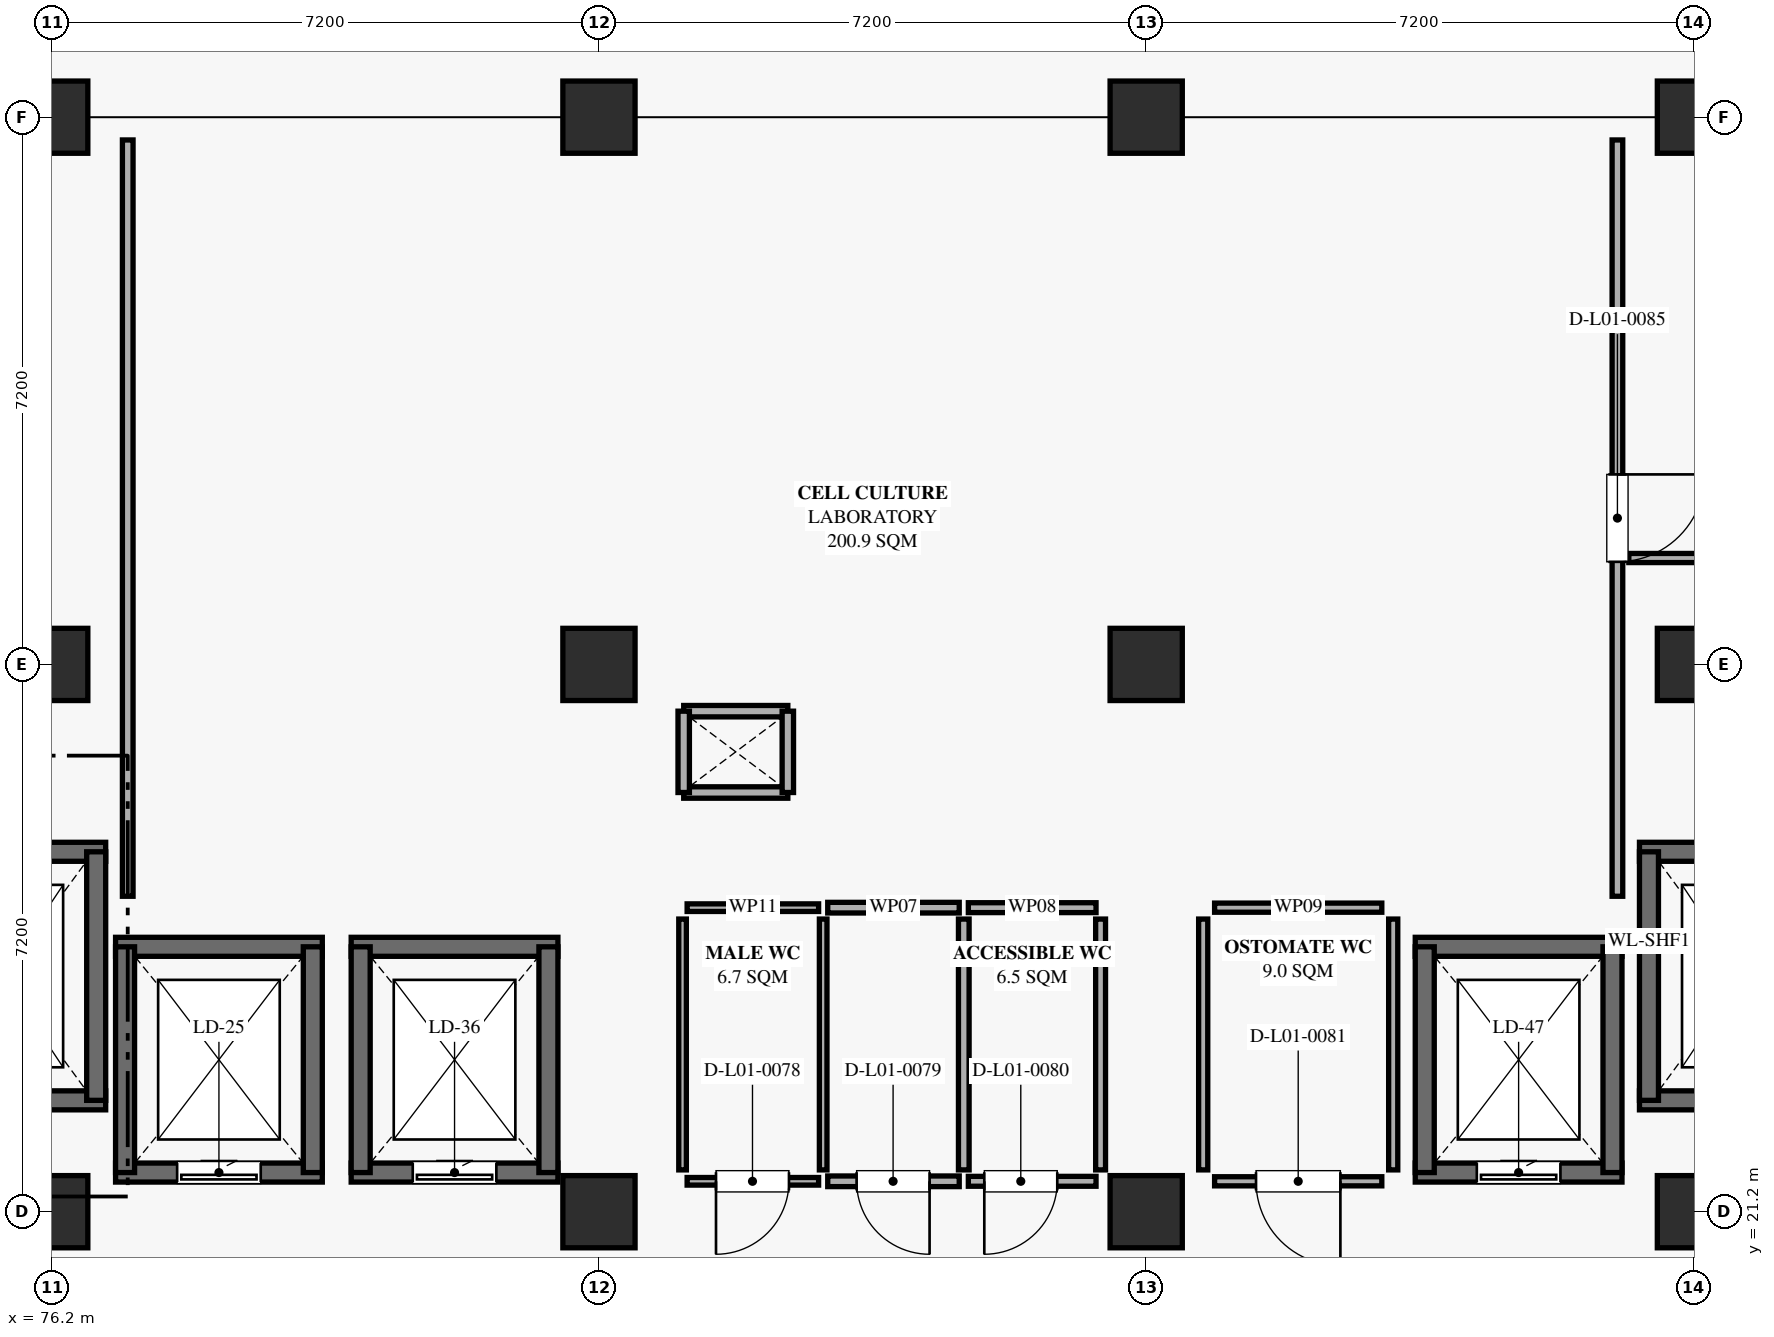
"""IFC4 building model, lengths in metres.
Left out: names, types, materials, properties, quantities, classifications, styles, units other than length and angle.
Written with IfcOpenShell. Run it as: python <this file> out.ifc"""

import sys

from ifc_helpers import new_model, si_unit, direction, frame, frame_2d, origin, origin_2d, place, context, subcontext, project, spatial, rectangle, extrude, element, fill, save


model = new_model("IFC4")
c1 = context("Model", 3, precision=1e-05, world=origin(), true_north=direction((0.0, 1.0)))
c2 = subcontext(c1, "Body", "Model", "MODEL_VIEW")
j1 = project(units=[si_unit("LENGTHUNIT", "METRE"), si_unit("PLANEANGLEUNIT", "RADIAN")], contexts=[c1])
p1 = place(None, origin())
s1 = spatial("IfcSite", under=j1, at=p1, CompositionType="ELEMENT")
p2 = place(p1, origin())
s2 = spatial("IfcBuilding", under=s1, at=p2, CompositionType="ELEMENT")
p3 = place(p2, frame((0.0, 0.0, 5.4)))
s3 = spatial("IfcBuildingStorey", under=s2, at=p3, CompositionType="ELEMENT", Elevation=5.4)
for number, where, z_axis, x_axis in (
    (1, (76.2, 21.2, 0.0), (0.0, 0.0, 1.0), (1.0, 0.0, 0.0)),
    (2, (83.4, 21.2, 0.0), (0.0, 0.0, 1.0), (1.0, 0.0, 0.0)),
    (3, (90.6, 21.2, 0.0), (0.0, 0.0, 1.0), (1.0, 0.0, 0.0)),
    (4, (97.8, 21.2, 0.0), (0.0, 0.0, 1.0), (1.0, 0.0, 0.0)),
    (5, (76.2, 28.4, 0.0), (0.0, 0.0, 1.0), (1.0, 0.0, 0.0)),
    (6, (83.4, 28.4, 0.0), (0.0, 0.0, 1.0), (1.0, 0.0, 0.0)),
    (7, (90.6, 28.4, 0.0), (0.0, 0.0, 1.0), (1.0, 0.0, 0.0)),
    (8, (97.8, 28.4, 0.0), (0.0, 0.0, 1.0), (1.0, 0.0, 0.0)),
    (9, (76.2, 35.6, 0.0), (0.0, 0.0, 1.0), (1.0, 0.0, 0.0)),
    (10, (83.4, 35.6, 0.0), (0.0, 0.0, 1.0), (1.0, 0.0, 0.0)),
    (11, (90.6, 35.6, 0.0), (0.0, 0.0, 1.0), (1.0, 0.0, 0.0)),
    (12, (97.8, 35.6, 0.0), (0.0, 0.0, 1.0), (1.0, 0.0, 0.0)),
):
    element("IfcColumn", number, at=place(p3, frame(where, z_axis=z_axis, x_axis=x_axis)), inside=s3, PredefinedType="COLUMN", context=c2, shape_type="SweptSolid", body=[
        extrude(rectangle(XDim=0.95, YDim=0.95, at=origin_2d()), origin(), (0.0, 0.0, 1.0), 5.04),
    ])
for number, where, z_axis, x_axis in (
    (13, (85.885, 26.715, 0.0), (0.0, 0.0, 1.0), (-1.0, 0.0, 0.0)),
    (14, (84.515, 27.785, 0.0), (0.0, 0.0, 1.0), (1.0, 0.0, 0.0)),
):
    element("IfcWall", number, at=place(p3, frame(where, z_axis=z_axis, x_axis=x_axis)), inside=s3, PredefinedType="PARTITIONING", context=c2, shape_type="SweptSolid", body=[
        extrude(rectangle(XDim=1.37, YDim=0.15, at=frame_2d((0.685, 0.0))), origin(), (0.0, 0.0, 1.0), 3.52),
    ])
for number, where, z_axis, x_axis in (
    (15, (84.515, 26.715, 0.0), (0.0, 0.0, 1.0), (0.0, 1.0, 0.0)),
    (16, (85.885, 27.785, 0.0), (0.0, 0.0, 1.0), (0.0, -1.0, 0.0)),
):
    element("IfcWall", number, at=place(p3, frame(where, z_axis=z_axis, x_axis=x_axis)), inside=s3, PredefinedType="PARTITIONING", context=c2, shape_type="SweptSolid", body=[
        extrude(rectangle(XDim=1.07, YDim=0.15, at=frame_2d((0.535, 0.0))), origin(), (0.0, 0.0, 1.0), 3.52),
    ])
for number, where, z_axis, x_axis in (
    (17, (76.91, 22.665, 0.0), (0.0, 0.0, 1.0), (-1.0, 0.0, 0.0)),
    (18, (74.19, 25.935, 0.0), (0.0, 0.0, 1.0), (1.0, 0.0, 0.0)),
):
    element("IfcWall", number, at=place(p3, frame(where, z_axis=z_axis, x_axis=x_axis)), inside=s3, PredefinedType="SHEAR", context=c2, shape_type="SweptSolid", body=[
        extrude(rectangle(XDim=2.72, YDim=0.25, at=frame_2d((1.36, 0.0))), origin(), (0.0, 0.0, 1.0), 4.77),
    ])
p4 = place(p3, frame((76.785, 25.935, 0.0), z_axis=(0.0, 0.0, 1.0), x_axis=(0.0, -1.0, 0.0)))
e19 = element("IfcWall", 19, at=p4, inside=s3, PredefinedType="SHEAR", context=c2, shape_type="SweptSolid", body=[
    extrude(rectangle(XDim=3.27, YDim=0.25, at=frame_2d((1.635, 0.0))), origin(), (0.0, 0.0, 1.0), 4.77),
])
for number, where, z_axis, x_axis in (
    (20, (99.81, 22.665, 0.0), (0.0, 0.0, 1.0), (-1.0, 0.0, 0.0)),
    (21, (97.09, 25.935, 0.0), (0.0, 0.0, 1.0), (1.0, 0.0, 0.0)),
):
    element("IfcWall", number, at=place(p3, frame(where, z_axis=z_axis, x_axis=x_axis)), inside=s3, PredefinedType="SHEAR", context=c2, shape_type="SweptSolid", body=[
        extrude(rectangle(XDim=2.72, YDim=0.25, at=frame_2d((1.36, 0.0))), origin(), (0.0, 0.0, 1.0), 4.77),
    ])
p5 = place(p3, frame((97.215, 22.665, 0.0), z_axis=(0.0, 0.0, 1.0), x_axis=(0.0, 1.0, 0.0)))
e22 = element("IfcWall", 22, at=p5, inside=s3, PredefinedType="SHEAR", context=c2, shape_type="SweptSolid", body=[
    extrude(rectangle(XDim=3.27, YDim=0.25, at=frame_2d((1.635, 0.0))), origin(), (0.0, 0.0, 1.0), 4.77),
])
p6 = place(p3, frame((79.76, 21.715, 0.0), z_axis=(0.0, 0.0, 1.0), x_axis=(-1.0, 0.0, 0.0)))
e23 = element("IfcWall", 23, at=p6, inside=s3, PredefinedType="SHEAR", context=c2, shape_type="SweptSolid", body=[
    extrude(rectangle(XDim=2.72, YDim=0.25, at=frame_2d((1.36, 0.0))), origin(), (0.0, 0.0, 1.0), 4.77),
])
p7 = place(p6, frame((0.81, 0.0, 0.0)))
e24 = element("IfcOpeningElement", 24, at=p7, cuts=e23, PredefinedType="OPENING", context=c2, shape_type="SweptSolid", body=[
    extrude(rectangle(XDim=1.1, YDim=2.2, at=frame_2d((0.55, 1.1))), frame((0.0, 0.135, 0.0), z_axis=(0.0, -1.0, 0.0), x_axis=(1.0, 0.0, 0.0)), (0.0, 0.0, 1.0), 0.27),
])
p8 = place(p3, frame((77.04, 24.685, 0.0), z_axis=(0.0, 0.0, 1.0), x_axis=(1.0, 0.0, 0.0)))
e25 = element("IfcWall", 25, at=p8, inside=s3, PredefinedType="SHEAR", context=c2, shape_type="SweptSolid", body=[
    extrude(rectangle(XDim=2.72, YDim=0.25, at=frame_2d((1.36, 0.0))), origin(), (0.0, 0.0, 1.0), 4.77),
])
for number, where, z_axis, x_axis in (
    (26, (77.165, 21.715, 0.0), (0.0, 0.0, 1.0), (0.0, 1.0, 0.0)),
    (27, (79.635, 24.685, 0.0), (0.0, 0.0, 1.0), (0.0, -1.0, 0.0)),
):
    element("IfcWall", number, at=place(p3, frame(where, z_axis=z_axis, x_axis=x_axis)), inside=s3, PredefinedType="SHEAR", context=c2, shape_type="SweptSolid", body=[
        extrude(rectangle(XDim=2.97, YDim=0.25, at=frame_2d((1.485, 0.0))), origin(), (0.0, 0.0, 1.0), 4.77),
    ])
p9 = place(p3, frame((82.86, 21.715, 0.0), z_axis=(0.0, 0.0, 1.0), x_axis=(-1.0, 0.0, 0.0)))
e28 = element("IfcWall", 28, at=p9, inside=s3, PredefinedType="SHEAR", context=c2, shape_type="SweptSolid", body=[
    extrude(rectangle(XDim=2.72, YDim=0.25, at=frame_2d((1.36, 0.0))), origin(), (0.0, 0.0, 1.0), 4.77),
])
p10 = place(p9, frame((0.81, 0.0, 0.0)))
e29 = element("IfcOpeningElement", 29, at=p10, cuts=e28, PredefinedType="OPENING", context=c2, shape_type="SweptSolid", body=[
    extrude(rectangle(XDim=1.1, YDim=2.2, at=frame_2d((0.55, 1.1))), frame((0.0, 0.135, 0.0), z_axis=(0.0, -1.0, 0.0), x_axis=(1.0, 0.0, 0.0)), (0.0, 0.0, 1.0), 0.27),
])
p11 = place(p3, frame((80.14, 24.685, 0.0), z_axis=(0.0, 0.0, 1.0), x_axis=(1.0, 0.0, 0.0)))
e30 = element("IfcWall", 30, at=p11, inside=s3, PredefinedType="SHEAR", context=c2, shape_type="SweptSolid", body=[
    extrude(rectangle(XDim=2.72, YDim=0.25, at=frame_2d((1.36, 0.0))), origin(), (0.0, 0.0, 1.0), 4.77),
])
for number, where, z_axis, x_axis in (
    (31, (80.265, 21.715, 0.0), (0.0, 0.0, 1.0), (0.0, 1.0, 0.0)),
    (32, (82.735, 24.685, 0.0), (0.0, 0.0, 1.0), (0.0, -1.0, 0.0)),
):
    element("IfcWall", number, at=place(p3, frame(where, z_axis=z_axis, x_axis=x_axis)), inside=s3, PredefinedType="SHEAR", context=c2, shape_type="SweptSolid", body=[
        extrude(rectangle(XDim=2.97, YDim=0.25, at=frame_2d((1.485, 0.0))), origin(), (0.0, 0.0, 1.0), 4.77),
    ])
p12 = place(p3, frame((96.86, 21.715, 0.0), z_axis=(0.0, 0.0, 1.0), x_axis=(-1.0, 0.0, 0.0)))
e33 = element("IfcWall", 33, at=p12, inside=s3, PredefinedType="SHEAR", context=c2, shape_type="SweptSolid", body=[
    extrude(rectangle(XDim=2.72, YDim=0.25, at=frame_2d((1.36, 0.0))), origin(), (0.0, 0.0, 1.0), 4.77),
])
p13 = place(p12, frame((0.81, 0.0, 0.0)))
e34 = element("IfcOpeningElement", 34, at=p13, cuts=e33, PredefinedType="OPENING", context=c2, shape_type="SweptSolid", body=[
    extrude(rectangle(XDim=1.1, YDim=2.2, at=frame_2d((0.55, 1.1))), frame((0.0, 0.135, 0.0), z_axis=(0.0, -1.0, 0.0), x_axis=(1.0, 0.0, 0.0)), (0.0, 0.0, 1.0), 0.27),
])
p14 = place(p3, frame((94.14, 24.685, 0.0), z_axis=(0.0, 0.0, 1.0), x_axis=(1.0, 0.0, 0.0)))
e35 = element("IfcWall", 35, at=p14, inside=s3, PredefinedType="SHEAR", context=c2, shape_type="SweptSolid", body=[
    extrude(rectangle(XDim=2.72, YDim=0.25, at=frame_2d((1.36, 0.0))), origin(), (0.0, 0.0, 1.0), 4.77),
])
for number, where, z_axis, x_axis in (
    (36, (94.265, 21.715, 0.0), (0.0, 0.0, 1.0), (0.0, 1.0, 0.0)),
    (37, (96.735, 24.685, 0.0), (0.0, 0.0, 1.0), (0.0, -1.0, 0.0)),
):
    element("IfcWall", number, at=place(p3, frame(where, z_axis=z_axis, x_axis=x_axis)), inside=s3, PredefinedType="SHEAR", context=c2, shape_type="SweptSolid", body=[
        extrude(rectangle(XDim=2.97, YDim=0.25, at=frame_2d((1.485, 0.0))), origin(), (0.0, 0.0, 1.0), 4.77),
    ])
p15 = place(p3, frame((86.29, 21.6, 0.0), z_axis=(0.0, 0.0, 1.0), x_axis=(-1.0, 0.0, 0.0)))
e38 = element("IfcWall", 38, at=p15, inside=s3, PredefinedType="PARTITIONING", context=c2, shape_type="SweptSolid", body=[
    extrude(rectangle(XDim=1.73, YDim=0.1, at=frame_2d((0.865, 0.0))), origin(), (0.0, 0.0, 1.0), 3.52),
])
p16 = place(p15, frame((0.39, 0.0, 0.0)))
e39 = element("IfcOpeningElement", 39, at=p16, cuts=e38, PredefinedType="OPENING", context=c2, shape_type="SweptSolid", body=[
    extrude(rectangle(XDim=0.96, YDim=2.1, at=frame_2d((0.48, 1.05))), frame((0.0, 0.06, 0.0), z_axis=(0.0, -1.0, 0.0), x_axis=(1.0, 0.0, 0.0)), (0.0, 0.0, 1.0), 0.12),
])
p17 = place(p3, frame((84.56, 25.2, 0.0), z_axis=(0.0, 0.0, 1.0), x_axis=(1.0, 0.0, 0.0)))
e40 = element("IfcWall", 40, at=p17, inside=s3, PredefinedType="PARTITIONING", context=c2, shape_type="SweptSolid", body=[
    extrude(rectangle(XDim=1.73, YDim=0.1, at=frame_2d((0.865, 0.0))), origin(), (0.0, 0.0, 1.0), 3.52),
])
for number, where, z_axis, x_axis in (
    (41, (84.5, 21.75, 0.0), (0.0, 0.0, 1.0), (0.0, 1.0, 0.0)),
    (42, (86.35, 25.05, 0.0), (0.0, 0.0, 1.0), (0.0, -1.0, 0.0)),
):
    element("IfcWall", number, at=place(p3, frame(where, z_axis=z_axis, x_axis=x_axis)), inside=s3, PredefinedType="PARTITIONING", context=c2, shape_type="SweptSolid", body=[
        extrude(rectangle(XDim=3.3, YDim=0.1, at=frame_2d((1.65, 0.0))), origin(), (0.0, 0.0, 1.0), 3.52),
    ])
p18 = place(p3, frame((88.14, 21.6, 0.0), z_axis=(0.0, 0.0, 1.0), x_axis=(-1.0, 0.0, 0.0)))
e43 = element("IfcWall", 43, at=p18, inside=s3, PredefinedType="PARTITIONING", context=c2, shape_type="SweptSolid", body=[
    extrude(rectangle(XDim=1.73, YDim=0.14, at=frame_2d((0.865, 0.0))), origin(), (0.0, 0.0, 1.0), 3.52),
])
p19 = place(p18, frame((0.39, 0.0, 0.0)))
e44 = element("IfcOpeningElement", 44, at=p19, cuts=e43, PredefinedType="OPENING", context=c2, shape_type="SweptSolid", body=[
    extrude(rectangle(XDim=0.96, YDim=2.16, at=frame_2d((0.48, 1.08))), frame((0.0, 0.08, 0.0), z_axis=(0.0, -1.0, 0.0), x_axis=(1.0, 0.0, 0.0)), (0.0, 0.0, 1.0), 0.16),
])
p20 = place(p3, frame((86.41, 25.2, 0.0), z_axis=(0.0, 0.0, 1.0), x_axis=(1.0, 0.0, 0.0)))
e45 = element("IfcWall", 45, at=p20, inside=s3, PredefinedType="PARTITIONING", context=c2, shape_type="SweptSolid", body=[
    extrude(rectangle(XDim=1.73, YDim=0.14, at=frame_2d((0.865, 0.0))), origin(), (0.0, 0.0, 1.0), 3.52),
])
p21 = place(p3, frame((88.2, 25.05, 0.0), z_axis=(0.0, 0.0, 1.0), x_axis=(0.0, -1.0, 0.0)))
e46 = element("IfcWall", 46, at=p21, inside=s3, PredefinedType="PARTITIONING", context=c2, shape_type="SweptSolid", body=[
    extrude(rectangle(XDim=3.3, YDim=0.14, at=frame_2d((1.65, 0.0))), origin(), (0.0, 0.0, 1.0), 3.52),
])
p22 = place(p3, frame((89.94, 21.6, 0.0), z_axis=(0.0, 0.0, 1.0), x_axis=(-1.0, 0.0, 0.0)))
e47 = element("IfcWall", 47, at=p22, inside=s3, PredefinedType="PARTITIONING", context=c2, shape_type="SweptSolid", body=[
    extrude(rectangle(XDim=1.68, YDim=0.13, at=frame_2d((0.84, 0.0))), origin(), (0.0, 0.0, 1.0), 3.52),
])
p23 = place(p22, frame((0.51, 0.0, 0.0)))
e48 = element("IfcOpeningElement", 48, at=p23, cuts=e47, PredefinedType="OPENING", context=c2, shape_type="SweptSolid", body=[
    extrude(rectangle(XDim=0.96, YDim=2.22, at=frame_2d((0.48, 1.11))), frame((0.0, 0.075, 0.0), z_axis=(0.0, -1.0, 0.0), x_axis=(1.0, 0.0, 0.0)), (0.0, 0.0, 1.0), 0.15),
])
p24 = place(p3, frame((88.26, 25.2, 0.0), z_axis=(0.0, 0.0, 1.0), x_axis=(1.0, 0.0, 0.0)))
e49 = element("IfcWall", 49, at=p24, inside=s3, PredefinedType="PARTITIONING", context=c2, shape_type="SweptSolid", body=[
    extrude(rectangle(XDim=1.68, YDim=0.13, at=frame_2d((0.84, 0.0))), origin(), (0.0, 0.0, 1.0), 3.52),
])
p25 = place(p3, frame((90.0, 25.05, 0.0), z_axis=(0.0, 0.0, 1.0), x_axis=(0.0, -1.0, 0.0)))
e50 = element("IfcWall", 50, at=p25, inside=s3, PredefinedType="PARTITIONING", context=c2, shape_type="SweptSolid", body=[
    extrude(rectangle(XDim=3.3, YDim=0.13, at=frame_2d((1.65, 0.0))), origin(), (0.0, 0.0, 1.0), 3.52),
])
p26 = place(p3, frame((93.7, 21.6, 0.0), z_axis=(0.0, 0.0, 1.0), x_axis=(-1.0, 0.0, 0.0)))
e51 = element("IfcWall", 51, at=p26, inside=s3, PredefinedType="PARTITIONING", context=c2, shape_type="SweptSolid", body=[
    extrude(rectangle(XDim=2.2, YDim=0.12, at=frame_2d((1.1, 0.0))), origin(), (0.0, 0.0, 1.0), 3.52),
])
p27 = place(p26, frame((0.545, 0.0, 0.0)))
e52 = element("IfcOpeningElement", 52, at=p27, cuts=e51, PredefinedType="OPENING", context=c2, shape_type="SweptSolid", body=[
    extrude(rectangle(XDim=1.11, YDim=2.05, at=frame_2d((0.555, 1.025))), frame((0.0, 0.07, 0.0), z_axis=(0.0, -1.0, 0.0), x_axis=(1.0, 0.0, 0.0)), (0.0, 0.0, 1.0), 0.14),
])
p28 = place(p3, frame((91.5, 25.2, 0.0), z_axis=(0.0, 0.0, 1.0), x_axis=(1.0, 0.0, 0.0)))
e53 = element("IfcWall", 53, at=p28, inside=s3, PredefinedType="PARTITIONING", context=c2, shape_type="SweptSolid", body=[
    extrude(rectangle(XDim=2.2, YDim=0.12, at=frame_2d((1.1, 0.0))), origin(), (0.0, 0.0, 1.0), 3.52),
])
for number, where, z_axis, x_axis in (
    (54, (91.35, 21.75, 0.0), (0.0, 0.0, 1.0), (0.0, 1.0, 0.0)),
    (55, (93.85, 25.05, 0.0), (0.0, 0.0, 1.0), (0.0, -1.0, 0.0)),
):
    element("IfcWall", number, at=place(p3, frame(where, z_axis=z_axis, x_axis=x_axis)), inside=s3, PredefinedType="PARTITIONING", context=c2, shape_type="SweptSolid", body=[
        extrude(rectangle(XDim=3.3, YDim=0.12, at=frame_2d((1.65, 0.0))), origin(), (0.0, 0.0, 1.0), 3.52),
    ])
p29 = place(p3, frame((77.2, 25.35, 0.0), z_axis=(0.0, 0.0, 1.0), x_axis=(0.0, 1.0, 0.0)))
e56 = element("IfcWall", 56, at=p29, inside=s3, PredefinedType="PARTITIONING", context=c2, shape_type="SweptSolid", body=[
    extrude(rectangle(XDim=9.95, YDim=0.14, at=frame_2d((4.975, 0.0))), origin(), (0.0, 0.0, 1.0), 3.52),
])
p30 = place(p3, frame((96.8, 35.3, 0.0), z_axis=(0.0, 0.0, 1.0), x_axis=(0.0, -1.0, 0.0)))
e57 = element("IfcWall", 57, at=p30, inside=s3, PredefinedType="PARTITIONING", context=c2, shape_type="SweptSolid", body=[
    extrude(rectangle(XDim=9.95, YDim=0.14, at=frame_2d((4.975, 0.0))), origin(), (0.0, 0.0, 1.0), 3.52),
])
p31 = place(p30, frame((4.4, 0.0, 0.0)))
e58 = element("IfcOpeningElement", 58, at=p31, cuts=e57, PredefinedType="OPENING", context=c2, shape_type="SweptSolid", body=[
    extrude(rectangle(XDim=1.15, YDim=2.05, at=frame_2d((0.575, 1.025))), frame((0.0, 0.08, 0.0), z_axis=(0.0, -1.0, 0.0), x_axis=(1.0, 0.0, 0.0)), (0.0, 0.0, 1.0), 0.16),
])
p32 = place(p3, frame((111.03, 29.8, 0.0), z_axis=(0.0, 0.0, 1.0), x_axis=(-1.0, 0.0, 0.0)))
e59 = element("IfcWall", 59, at=p32, inside=s3, PredefinedType="PARTITIONING", context=c2, shape_type="SweptSolid", body=[
    extrude(rectangle(XDim=14.08, YDim=0.12, at=frame_2d((7.04, 0.0))), origin(), (0.0, 0.0, 1.0), 3.52),
])
p33 = place(p32, frame((9.055, 0.0, 0.0)))
e60 = element("IfcOpeningElement", 60, at=p33, cuts=e59, PredefinedType="OPENING", context=c2, shape_type="SweptSolid", body=[
    extrude(rectangle(XDim=1.15, YDim=2.1, at=frame_2d((0.575, 1.05))), frame((0.0, 0.07, 0.0), z_axis=(0.0, -1.0, 0.0), x_axis=(1.0, 0.0, 0.0)), (0.0, 0.0, 1.0), 0.14),
])
p34 = place(p7, origin())
e61 = element("IfcDoor", 61, at=p34, inside=s3, OperationType="SLIDING_TO_LEFT", PredefinedType="DOOR", context=c2, shape_type="SweptSolid", body=[
    extrude(rectangle(XDim=1.1, YDim=2.2, at=frame_2d((0.55, 1.1))), frame((0.0, 0.025, 0.0), z_axis=(0.0, -1.0, 0.0), x_axis=(1.0, 0.0, 0.0)), (0.0, 0.0, 1.0), 0.05),
])
fill(e24, e61)
p35 = place(p10, origin())
e62 = element("IfcDoor", 62, at=p35, inside=s3, OperationType="SLIDING_TO_LEFT", PredefinedType="DOOR", context=c2, shape_type="SweptSolid", body=[
    extrude(rectangle(XDim=1.1, YDim=2.2, at=frame_2d((0.55, 1.1))), frame((0.0, 0.025, 0.0), z_axis=(0.0, -1.0, 0.0), x_axis=(1.0, 0.0, 0.0)), (0.0, 0.0, 1.0), 0.05),
])
fill(e29, e62)
p36 = place(p13, origin())
e63 = element("IfcDoor", 63, at=p36, inside=s3, OperationType="SLIDING_TO_LEFT", PredefinedType="DOOR", context=c2, shape_type="SweptSolid", body=[
    extrude(rectangle(XDim=1.1, YDim=2.2, at=frame_2d((0.55, 1.1))), frame((0.0, 0.025, 0.0), z_axis=(0.0, -1.0, 0.0), x_axis=(1.0, 0.0, 0.0)), (0.0, 0.0, 1.0), 0.05),
])
fill(e34, e63)
p37 = place(p16, origin())
e64 = element("IfcDoor", 64, at=p37, inside=s3, OperationType="SINGLE_SWING_RIGHT", PredefinedType="DOOR", context=c2, shape_type="SweptSolid", body=[
    extrude(rectangle(XDim=0.96, YDim=2.1, at=frame_2d((0.48, 1.05))), frame((0.0, 0.025, 0.0), z_axis=(0.0, -1.0, 0.0), x_axis=(1.0, 0.0, 0.0)), (0.0, 0.0, 1.0), 0.05),
])
fill(e39, e64)
p38 = place(p19, origin())
e65 = element("IfcDoor", 65, at=p38, inside=s3, OperationType="SINGLE_SWING_LEFT", PredefinedType="DOOR", context=c2, shape_type="SweptSolid", body=[
    extrude(rectangle(XDim=0.96, YDim=2.16, at=frame_2d((0.48, 1.08))), frame((0.0, 0.025, 0.0), z_axis=(0.0, -1.0, 0.0), x_axis=(1.0, 0.0, 0.0)), (0.0, 0.0, 1.0), 0.05),
])
fill(e44, e65)
p39 = place(p23, origin())
e66 = element("IfcDoor", 66, at=p39, inside=s3, OperationType="SINGLE_SWING_RIGHT", PredefinedType="DOOR", context=c2, shape_type="SweptSolid", body=[
    extrude(rectangle(XDim=0.96, YDim=2.22, at=frame_2d((0.48, 1.11))), frame((0.0, 0.025, 0.0), z_axis=(0.0, -1.0, 0.0), x_axis=(1.0, 0.0, 0.0)), (0.0, 0.0, 1.0), 0.05),
])
fill(e48, e66)
p40 = place(p27, origin())
e67 = element("IfcDoor", 67, at=p40, inside=s3, OperationType="SINGLE_SWING_LEFT", PredefinedType="DOOR", context=c2, shape_type="SweptSolid", body=[
    extrude(rectangle(XDim=1.11, YDim=2.05, at=frame_2d((0.555, 1.025))), frame((0.0, 0.025, 0.0), z_axis=(0.0, -1.0, 0.0), x_axis=(1.0, 0.0, 0.0)), (0.0, 0.0, 1.0), 0.05),
])
fill(e52, e67)
p41 = place(p31, origin())
e68 = element("IfcDoor", 68, at=p41, inside=s3, OperationType="SINGLE_SWING_LEFT", PredefinedType="DOOR", context=c2, shape_type="SweptSolid", body=[
    extrude(rectangle(XDim=1.15, YDim=2.05, at=frame_2d((0.575, 1.025))), frame((0.0, 0.025, 0.0), z_axis=(0.0, -1.0, 0.0), x_axis=(1.0, 0.0, 0.0)), (0.0, 0.0, 1.0), 0.05),
])
fill(e58, e68)
save(model, sys.argv[1])
